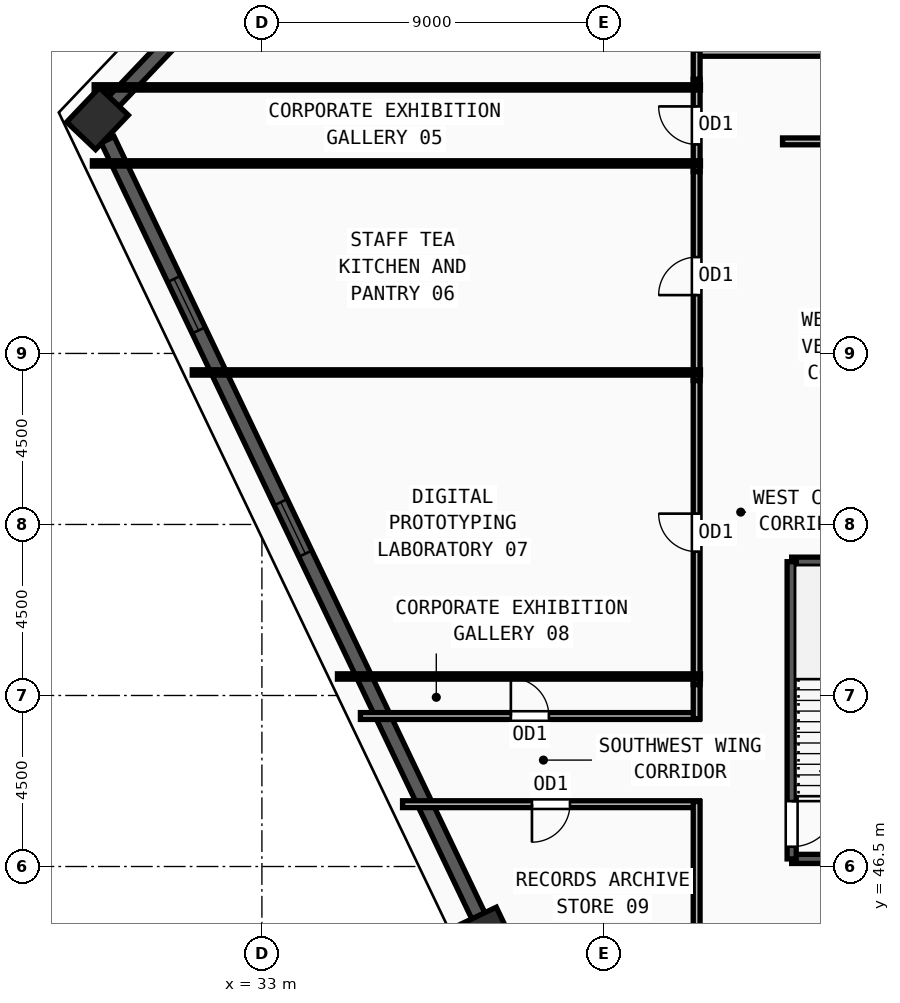
"""IFC4 building model, lengths in metres.
Left out: names, types, materials, properties, quantities, classifications, styles, units other than length and angle.
Written with IfcOpenShell. Run it as: python <this file> out.ifc"""

import sys

from ifc_helpers import new_model, si_unit, direction, frame, frame_2d, origin, origin_2d, place, context, subcontext, project, spatial, rectangle, extrude, source, transform, mapped, element, fill, save


model = new_model("IFC4")
c1 = context("Model", 3, precision=1e-05, world=origin(), true_north=direction((0.0, 1.0)))
c2 = subcontext(c1, "Body", "Model", "MODEL_VIEW")
j1 = project(units=[si_unit("LENGTHUNIT", "METRE"), si_unit("PLANEANGLEUNIT", "RADIAN")], contexts=[c1])
p1 = place(None, origin())
s1 = spatial("IfcSite", under=j1, at=p1, CompositionType="ELEMENT")
p2 = place(p1, origin())
s2 = spatial("IfcBuilding", under=s1, at=p2, CompositionType="ELEMENT")
p3 = place(p2, frame((0.0, 0.0, 270.0)))
s3 = spatial("IfcBuildingStorey", under=s2, at=p3, CompositionType="ELEMENT", Elevation=270.0)
m1 = source(origin(), c2, "Body", "SweptSolid", [
    extrude(rectangle(XDim=1.25, YDim=1.05, at=origin_2d()), origin(), (0.0, 0.0, 1.0), 3.75),
])
for number, where, z_axis, x_axis in (
    (1, (38.964, 44.639, 0.0), (0.0, 0.0, 1.0), (-0.431, 0.902, 0.0)),
    (2, (28.674, 66.179, 0.0), (0.0, 0.0, 1.0), (0.689, 0.724, 0.0)),
):
    element("IfcColumn", number, at=place(p3, frame(where, z_axis=z_axis, x_axis=x_axis)), inside=s3, PredefinedType="COLUMN", context=c2, shape_type="MappedRepresentation", body=[
        mapped(m1, transform((0.0, 0.0, 0.0), x_axis=(1.0, 0.0, 0.0), y_axis=(0.0, 1.0, 0.0), z_axis=(0.0, 0.0, 1.0), scale=1.0)),
    ])
p4 = place(p3, frame((31.878, 69.546, 0.0), z_axis=(0.0, 0.0, 1.0), x_axis=(-0.689423828673, -0.724358187955, 0.0)))
e3 = element("IfcWall", 3, at=p4, inside=s3, PredefinedType="SOLIDWALL", context=c2, shape_type="SweptSolid", body=[
    extrude(rectangle(XDim=4.032, YDim=0.38, at=frame_2d((2.016, 0.0))), origin(), (0.0, 0.0, 1.0), 3.57),
])
p5 = place(p3, frame((28.939, 65.624, 0.0), z_axis=(0.0, 0.0, 1.0), x_axis=(0.431066278959, -0.902320266393, 0.0)))
e4 = element("IfcWall", 4, at=p5, inside=s3, PredefinedType="SOLIDWALL", context=c2, shape_type="SweptSolid", body=[
    extrude(rectangle(XDim=22.642, YDim=0.38, at=frame_2d((11.321, 0.0))), origin(), (0.0, 0.0, 1.0), 3.57),
])
m2 = source(origin(), c2, "Body", "SweptSolid", [
    extrude(rectangle(XDim=1.5, YDim=1.9, at=frame_2d((0.75, 0.95))), frame((0.0, 0.2, 0.0), z_axis=(0.0, -1.0, 0.0), x_axis=(1.0, 0.0, 0.0)), (0.0, 0.0, 1.0), 0.4),
])
p6 = place(p5, frame((4.06, 0.0, 0.55)))
e5 = element("IfcOpeningElement", 5, at=p6, cuts=e4, PredefinedType="OPENING", context=c2, shape_type="MappedRepresentation", body=[
    mapped(m2, transform((0.0, 0.0, 0.0), x_axis=(1.0, 0.0, 0.0), y_axis=(0.0, 1.0, 0.0), z_axis=(0.0, 0.0, 1.0), scale=1.0)),
])
p7 = place(p5, frame((10.571, 0.0, 0.55)))
e6 = element("IfcOpeningElement", 6, at=p7, cuts=e4, PredefinedType="OPENING", context=c2, shape_type="MappedRepresentation", body=[
    mapped(m2, transform((0.0, 0.0, 0.0), x_axis=(1.0, 0.0, 0.0), y_axis=(0.0, 1.0, 0.0), z_axis=(0.0, 0.0, 1.0), scale=1.0)),
])
for number, where, z_axis, x_axis in (
    (7, (46.94, 46.7, 0.0), (0.0, 0.0, 1.0), (1.0, 0.0, 0.0)),
    (8, (50.38, 54.52, 0.0), (0.0, 0.0, 1.0), (-1.0, 0.0, 0.0)),
):
    element("IfcWall", number, at=place(p3, frame(where, z_axis=z_axis, x_axis=x_axis)), inside=s3, PredefinedType="SOLIDWALL", context=c2, shape_type="SweptSolid", body=[
        extrude(rectangle(XDim=3.44, YDim=0.24, at=frame_2d((1.72, 0.0))), origin(), (0.0, 0.0, 1.0), 3.57),
    ])
p8 = place(p3, frame((46.94, 54.52, 0.0), z_axis=(0.0, 0.0, 1.0), x_axis=(0.0, -1.0, 0.0)))
e9 = element("IfcWall", 9, at=p8, inside=s3, PredefinedType="SOLIDWALL", context=c2, shape_type="SweptSolid", body=[
    extrude(rectangle(XDim=7.82, YDim=0.24, at=frame_2d((3.91, 0.0))), origin(), (0.0, 0.0, 1.0), 3.57),
])
m3 = source(origin(), c2, "Body", "SweptSolid", [
    extrude(rectangle(XDim=1.2, YDim=2.2, at=frame_2d((0.6, 1.1))), frame((0.0, 0.13, 0.0), z_axis=(0.0, -1.0, 0.0), x_axis=(1.0, 0.0, 0.0)), (0.0, 0.0, 1.0), 0.26),
])
p9 = place(p8, frame((6.3, 0.0, 0.0)))
e10 = element("IfcOpeningElement", 10, at=p9, cuts=e9, PredefinedType="OPENING", context=c2, shape_type="MappedRepresentation", body=[
    mapped(m3, transform((0.0, 0.0, 0.0), x_axis=(1.0, 0.0, 0.0), y_axis=(0.0, 1.0, 0.0), z_axis=(0.0, 0.0, 1.0), scale=1.0)),
])
p10 = place(p3, frame((46.7, 65.58, 0.0), z_axis=(0.0, 0.0, 1.0), x_axis=(1.0, 0.0, 0.0)))
e11 = element("IfcWall", 11, at=p10, inside=s3, PredefinedType="PARTITIONING", context=c2, shape_type="SweptSolid", body=[
    extrude(rectangle(XDim=3.84, YDim=0.18, at=frame_2d((1.92, 0.0))), origin(), (0.0, 0.0, 1.0), 3.57),
])
m4 = source(origin(), c2, "Body", "SweptSolid", [
    extrude(rectangle(XDim=1.3, YDim=2.2, at=frame_2d((0.65, 1.1))), frame((0.0, 0.1, 0.0), z_axis=(0.0, -1.0, 0.0), x_axis=(1.0, 0.0, 0.0)), (0.0, 0.0, 1.0), 0.2),
])
p11 = place(p10, frame((1.27, 0.0, 0.0)))
e12 = element("IfcOpeningElement", 12, at=p11, cuts=e11, PredefinedType="OPENING", context=c2, shape_type="MappedRepresentation", body=[
    mapped(m4, transform((0.0, 0.0, 0.0), x_axis=(1.0, 0.0, 0.0), y_axis=(0.0, 1.0, 0.0), z_axis=(0.0, 0.0, 1.0), scale=1.0)),
])
p12 = place(p3, frame((44.37, 67.91, 0.0), z_axis=(0.0, 0.0, 1.0), x_axis=(1.0, 0.0, 0.0)))
e13 = element("IfcWall", 13, at=p12, inside=s3, PredefinedType="PARTITIONING", context=c2, shape_type="SweptSolid", body=[
    extrude(rectangle(XDim=8.915, YDim=0.18, at=frame_2d((4.458, 0.0))), origin(), (0.0, 0.0, 1.0), 3.205),
])
m5 = source(origin(), c2, "Body", "SweptSolid", [
    extrude(rectangle(XDim=1.5, YDim=2.2, at=frame_2d((0.75, 1.1))), frame((0.0, 0.1, 0.0), z_axis=(0.0, -1.0, 0.0), x_axis=(1.0, 0.0, 0.0)), (0.0, 0.0, 1.0), 0.2),
])
p13 = place(p12, frame((3.707, 0.0, 0.0)))
e14 = element("IfcOpeningElement", 14, at=p13, cuts=e13, PredefinedType="OPENING", context=c2, shape_type="MappedRepresentation", body=[
    mapped(m5, transform((0.0, 0.0, 0.0), x_axis=(1.0, 0.0, 0.0), y_axis=(0.0, 1.0, 0.0), z_axis=(0.0, 0.0, 1.0), scale=1.0)),
])
p14 = place(p3, frame((44.44, 64.785, 0.0), z_axis=(0.0, 0.0, 1.0), x_axis=(0.0, 1.0, 0.0)))
e15 = element("IfcWall", 15, at=p14, inside=s3, PredefinedType="PARTITIONING", context=c2, shape_type="SweptSolid", body=[
    extrude(rectangle(XDim=2.43, YDim=0.18, at=frame_2d((1.215, 0.0))), origin(), (0.0, 0.0, 1.0), 3.57),
])
m6 = source(origin(), c2, "Body", "SweptSolid", [
    extrude(rectangle(XDim=1.0, YDim=2.2, at=frame_2d((0.5, 1.1))), frame((0.0, 0.1, 0.0), z_axis=(0.0, -1.0, 0.0), x_axis=(1.0, 0.0, 0.0)), (0.0, 0.0, 1.0), 0.2),
])
p15 = place(p14, frame((0.715, 0.0, 0.0)))
e16 = element("IfcOpeningElement", 16, at=p15, cuts=e15, PredefinedType="OPENING", context=c2, shape_type="MappedRepresentation", body=[
    mapped(m6, transform((0.0, 0.0, 0.0), x_axis=(1.0, 0.0, 0.0), y_axis=(0.0, 1.0, 0.0), z_axis=(0.0, 0.0, 1.0), scale=1.0)),
])
p16 = place(p3, frame((44.44, 59.285, 0.0), z_axis=(0.0, 0.0, 1.0), x_axis=(0.0, 1.0, 0.0)))
e17 = element("IfcWall", 17, at=p16, inside=s3, PredefinedType="PARTITIONING", context=c2, shape_type="SweptSolid", body=[
    extrude(rectangle(XDim=5.5, YDim=0.18, at=frame_2d((2.75, 0.0))), origin(), (0.0, 0.0, 1.0), 3.57),
])
p17 = place(p16, frame((2.25, 0.0, 0.0)))
e18 = element("IfcOpeningElement", 18, at=p17, cuts=e17, PredefinedType="OPENING", context=c2, shape_type="MappedRepresentation", body=[
    mapped(m6, transform((0.0, 0.0, 0.0), x_axis=(1.0, 0.0, 0.0), y_axis=(0.0, 1.0, 0.0), z_axis=(0.0, 0.0, 1.0), scale=1.0)),
])
p18 = place(p3, frame((44.44, 51.285, 0.0), z_axis=(0.0, 0.0, 1.0), x_axis=(0.0, 1.0, 0.0)))
e19 = element("IfcWall", 19, at=p18, inside=s3, PredefinedType="PARTITIONING", context=c2, shape_type="SweptSolid", body=[
    extrude(rectangle(XDim=8.0, YDim=0.18, at=frame_2d((4.0, 0.0))), origin(), (0.0, 0.0, 1.0), 3.205),
])
p19 = place(p18, frame((3.5, 0.0, 0.0)))
e20 = element("IfcOpeningElement", 20, at=p19, cuts=e19, PredefinedType="OPENING", context=c2, shape_type="MappedRepresentation", body=[
    mapped(m6, transform((0.0, 0.0, 0.0), x_axis=(1.0, 0.0, 0.0), y_axis=(0.0, 1.0, 0.0), z_axis=(0.0, 0.0, 1.0), scale=1.0)),
])
p20 = place(p3, frame((35.592, 50.46, 0.0), z_axis=(0.0, 0.0, 1.0), x_axis=(1.0, 0.0, 0.0)))
e21 = element("IfcWall", 21, at=p20, inside=s3, PredefinedType="PARTITIONING", context=c2, shape_type="SweptSolid", body=[
    extrude(rectangle(XDim=8.918, YDim=0.18, at=frame_2d((4.459, 0.0))), origin(), (0.0, 0.0, 1.0), 3.57),
])
p21 = place(p20, frame((3.959, 0.0, 0.0)))
e22 = element("IfcOpeningElement", 22, at=p21, cuts=e21, PredefinedType="OPENING", context=c2, shape_type="MappedRepresentation", body=[
    mapped(m6, transform((0.0, 0.0, 0.0), x_axis=(1.0, 0.0, 0.0), y_axis=(0.0, 1.0, 0.0), z_axis=(0.0, 0.0, 1.0), scale=1.0)),
])
p22 = place(p3, frame((44.51, 48.14, 0.0), z_axis=(0.0, 0.0, 1.0), x_axis=(-1.0, 0.0, 0.0)))
e23 = element("IfcWall", 23, at=p22, inside=s3, PredefinedType="PARTITIONING", context=c2, shape_type="SweptSolid", body=[
    extrude(rectangle(XDim=7.809, YDim=0.18, at=frame_2d((3.905, 0.0))), origin(), (0.0, 0.0, 1.0), 3.57),
])
p23 = place(p22, frame((3.404, 0.0, 0.0)))
e24 = element("IfcOpeningElement", 24, at=p23, cuts=e23, PredefinedType="OPENING", context=c2, shape_type="MappedRepresentation", body=[
    mapped(m6, transform((0.0, 0.0, 0.0), x_axis=(1.0, 0.0, 0.0), y_axis=(0.0, 1.0, 0.0), z_axis=(0.0, 0.0, 1.0), scale=1.0)),
])
p24 = place(p3, frame((44.44, 67.215, 0.0), z_axis=(0.0, 0.0, 1.0), x_axis=(0.0, 1.0, 0.0)))
e25 = element("IfcWall", 25, at=p24, inside=s3, PredefinedType="PARTITIONING", context=c2, shape_type="SweptSolid", body=[
    extrude(rectangle(XDim=0.765, YDim=0.18, at=frame_2d((0.382, 0.0))), origin(), (0.0, 0.0, 1.0), 3.57),
])
p25 = place(p3, frame((44.44, 50.39, 0.0), z_axis=(0.0, 0.0, 1.0), x_axis=(0.0, 1.0, 0.0)))
e26 = element("IfcWall", 26, at=p25, inside=s3, PredefinedType="PARTITIONING", context=c2, shape_type="SweptSolid", body=[
    extrude(rectangle(XDim=0.895, YDim=0.18, at=frame_2d((0.448, 0.0))), origin(), (0.0, 0.0, 1.0), 3.57),
])
p26 = place(p3, frame((44.44, 44.385, 0.0), z_axis=(0.0, 0.0, 1.0), x_axis=(0.0, 1.0, 0.0)))
e27 = element("IfcWall", 27, at=p26, inside=s3, PredefinedType="PARTITIONING", context=c2, shape_type="SweptSolid", body=[
    extrude(rectangle(XDim=3.825, YDim=0.18, at=frame_2d((1.913, 0.0))), origin(), (0.0, 0.0, 1.0), 3.57),
])
p27 = place(p3, frame((44.54, 51.5, 0.0), z_axis=(0.0, 0.0, 1.0), x_axis=(-1.0, 0.0, 0.0)))
e28 = element("IfcWall", 28, at=p27, inside=s3, PredefinedType="PARTITIONING", context=c2, shape_type="SweptSolid", body=[
    extrude(rectangle(XDim=9.552, YDim=0.14, at=frame_2d((4.776, 0.0))), origin(), (0.0, 0.0, 1.0), 3.57),
])
p28 = place(p3, frame((44.54, 59.5, 0.0), z_axis=(0.0, 0.0, 1.0), x_axis=(-1.0, 0.0, 0.0)))
e29 = element("IfcWall", 29, at=p28, inside=s3, PredefinedType="PARTITIONING", context=c2, shape_type="SweptSolid", body=[
    extrude(rectangle(XDim=13.373, YDim=0.14, at=frame_2d((6.687, 0.0))), origin(), (0.0, 0.0, 1.0), 3.57),
])
p29 = place(p3, frame((44.54, 65.0, 0.0), z_axis=(0.0, 0.0, 1.0), x_axis=(-1.0, 0.0, 0.0)))
e30 = element("IfcWall", 30, at=p29, inside=s3, PredefinedType="PARTITIONING", context=c2, shape_type="SweptSolid", body=[
    extrude(rectangle(XDim=16.001, YDim=0.14, at=frame_2d((8.0, 0.0))), origin(), (0.0, 0.0, 1.0), 2.855),
])
p30 = place(p3, frame((44.54, 67.0, 0.0), z_axis=(0.0, 0.0, 1.0), x_axis=(-1.0, 0.0, 0.0)))
e31 = element("IfcWall", 31, at=p30, inside=s3, PredefinedType="PARTITIONING", context=c2, shape_type="SweptSolid", body=[
    extrude(rectangle(XDim=15.954, YDim=0.14, at=frame_2d((7.977, 0.0))), origin(), (0.0, 0.0, 1.0), 3.57),
])
m7 = source(origin(), c2, "Body", "SweptSolid", [
    extrude(rectangle(XDim=1.5, YDim=1.9, at=frame_2d((0.75, 0.95))), frame((0.0, 0.03, 0.0), z_axis=(0.0, -1.0, 0.0), x_axis=(1.0, 0.0, 0.0)), (0.0, 0.0, 1.0), 0.06),
])
p31 = place(p6, origin())
e32 = element("IfcWindow", 32, at=p31, inside=s3, PartitioningType="DOUBLE_PANEL_VERTICAL", PredefinedType="WINDOW", context=c2, shape_type="MappedRepresentation", body=[
    mapped(m7, transform((0.0, 0.0, 0.0), x_axis=(1.0, 0.0, 0.0), y_axis=(0.0, 1.0, 0.0), z_axis=(0.0, 0.0, 1.0), scale=1.0)),
])
fill(e5, e32)
p32 = place(p7, origin())
e33 = element("IfcWindow", 33, at=p32, inside=s3, PartitioningType="DOUBLE_PANEL_VERTICAL", PredefinedType="WINDOW", context=c2, shape_type="MappedRepresentation", body=[
    mapped(m7, transform((0.0, 0.0, 0.0), x_axis=(1.0, 0.0, 0.0), y_axis=(0.0, 1.0, 0.0), z_axis=(0.0, 0.0, 1.0), scale=1.0)),
])
fill(e6, e33)
m8 = source(origin(), c2, "Body", "SweptSolid", [
    extrude(rectangle(XDim=1.2, YDim=2.2, at=frame_2d((0.6, 1.1))), frame((0.0, 0.025, 0.0), z_axis=(0.0, -1.0, 0.0), x_axis=(1.0, 0.0, 0.0)), (0.0, 0.0, 1.0), 0.05),
])
p33 = place(p9, origin())
e34 = element("IfcDoor", 34, at=p33, inside=s3, OperationType="SINGLE_SWING_LEFT", PredefinedType="DOOR", context=c2, shape_type="MappedRepresentation", body=[
    mapped(m8, transform((0.0, 0.0, 0.0), x_axis=(1.0, 0.0, 0.0), y_axis=(0.0, 1.0, 0.0), z_axis=(0.0, 0.0, 1.0), scale=1.0)),
])
fill(e10, e34)
m9 = source(origin(), c2, "Body", "SweptSolid", [
    extrude(rectangle(XDim=1.0, YDim=2.2, at=frame_2d((0.5, 1.1))), frame((0.0, 0.025, 0.0), z_axis=(0.0, -1.0, 0.0), x_axis=(1.0, 0.0, 0.0)), (0.0, 0.0, 1.0), 0.05),
])
p34 = place(p15, origin())
e35 = element("IfcDoor", 35, at=p34, inside=s3, OperationType="SINGLE_SWING_RIGHT", PredefinedType="DOOR", context=c2, shape_type="MappedRepresentation", body=[
    mapped(m9, transform((0.0, 0.0, 0.0), x_axis=(1.0, 0.0, 0.0), y_axis=(0.0, 1.0, 0.0), z_axis=(0.0, 0.0, 1.0), scale=1.0)),
])
fill(e16, e35)
p35 = place(p17, origin())
e36 = element("IfcDoor", 36, at=p35, inside=s3, OperationType="SINGLE_SWING_LEFT", PredefinedType="DOOR", context=c2, shape_type="MappedRepresentation", body=[
    mapped(m9, transform((0.0, 0.0, 0.0), x_axis=(1.0, 0.0, 0.0), y_axis=(0.0, 1.0, 0.0), z_axis=(0.0, 0.0, 1.0), scale=1.0)),
])
fill(e18, e36)
p36 = place(p19, origin())
e37 = element("IfcDoor", 37, at=p36, inside=s3, OperationType="SINGLE_SWING_RIGHT", PredefinedType="DOOR", context=c2, shape_type="MappedRepresentation", body=[
    mapped(m9, transform((0.0, 0.0, 0.0), x_axis=(1.0, 0.0, 0.0), y_axis=(0.0, 1.0, 0.0), z_axis=(0.0, 0.0, 1.0), scale=1.0)),
])
fill(e20, e37)
p37 = place(p21, origin())
e38 = element("IfcDoor", 38, at=p37, inside=s3, OperationType="SINGLE_SWING_LEFT", PredefinedType="DOOR", context=c2, shape_type="MappedRepresentation", body=[
    mapped(m9, transform((0.0, 0.0, 0.0), x_axis=(1.0, 0.0, 0.0), y_axis=(0.0, 1.0, 0.0), z_axis=(0.0, 0.0, 1.0), scale=1.0)),
])
fill(e22, e38)
p38 = place(p23, origin())
e39 = element("IfcDoor", 39, at=p38, inside=s3, OperationType="SINGLE_SWING_RIGHT", PredefinedType="DOOR", context=c2, shape_type="MappedRepresentation", body=[
    mapped(m9, transform((0.0, 0.0, 0.0), x_axis=(1.0, 0.0, 0.0), y_axis=(0.0, 1.0, 0.0), z_axis=(0.0, 0.0, 1.0), scale=1.0)),
])
fill(e24, e39)
save(model, sys.argv[1])
